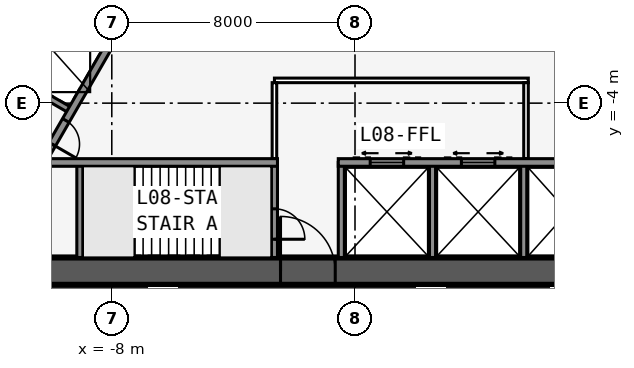
"""IFC4 building model, lengths in metres.
Left out: names, types, materials, properties, quantities, classifications, styles, units other than length and angle.
Written with IfcOpenShell. Run it as: python <this file> out.ifc"""

import sys

from ifc_helpers import new_model, si_unit, direction, frame, frame_2d, origin, place, context, subcontext, project, spatial, rectangle, extrude, element, fill, save


model = new_model("IFC4")
c1 = context("Model", 3, precision=1e-05, world=origin(), true_north=direction((0.0, 1.0)))
c2 = subcontext(c1, "Body", "Model", "MODEL_VIEW")
j1 = project(units=[si_unit("LENGTHUNIT", "METRE"), si_unit("PLANEANGLEUNIT", "RADIAN")], contexts=[c1])
p1 = place(None, origin())
s1 = spatial("IfcSite", under=j1, at=p1, CompositionType="ELEMENT")
p2 = place(p1, origin())
s2 = spatial("IfcBuilding", under=s1, at=p2, CompositionType="ELEMENT")
p3 = place(p2, frame((0.0, 0.0, 38.7)))
s3 = spatial("IfcBuildingStorey", under=s2, at=p3, CompositionType="ELEMENT", Elevation=38.7)
p4 = place(p3, frame((-16.5, -9.526, 0.0), z_axis=(0.0, 0.0, 1.0), x_axis=(1.0, 0.0, 0.0)))
e1 = element("IfcWall", 1, at=p4, inside=s3, PredefinedType="SHEAR", context=c2, shape_type="SweptSolid", body=[
    extrude(rectangle(XDim=33.0, YDim=0.9, at=frame_2d((16.5, 0.0))), origin(), (0.0, 0.0, 1.0), 3.4),
])
p5 = place(p4, frame((14.05, 0.0, 0.0)))
e2 = element("IfcOpeningElement", 2, at=p5, cuts=e1, PredefinedType="OPENING", context=c2, shape_type="SweptSolid", body=[
    extrude(rectangle(XDim=1.8, YDim=2.13, at=frame_2d((0.9, 1.065))), frame((0.0, 0.46, 0.0), z_axis=(0.0, -1.0, 0.0), x_axis=(1.0, 0.0, 0.0)), (0.0, 0.0, 1.0), 0.92),
])
p6 = place(p3, frame((-10.183, -5.951, 0.0), z_axis=(0.0, 0.0, 1.0), x_axis=(1.0, 0.0, 0.0)))
e3 = element("IfcWall", 3, at=p6, inside=s3, PredefinedType="SOLIDWALL", context=c2, shape_type="SweptSolid", body=[
    extrude(rectangle(XDim=7.633, YDim=0.25, at=frame_2d((3.816, 0.0))), origin(), (0.0, 0.0, 1.0), 3.235),
])
p7 = place(p3, frame((-0.55, -5.951, 0.0), z_axis=(0.0, 0.0, 1.0), x_axis=(1.0, 0.0, 0.0)))
e4 = element("IfcWall", 4, at=p7, inside=s3, PredefinedType="SOLIDWALL", context=c2, shape_type="SweptSolid", body=[
    extrude(rectangle(XDim=10.733, YDim=0.25, at=frame_2d((5.366, 0.0))), origin(), (0.0, 0.0, 1.0), 3.235),
])
p8 = place(p7, frame((9.314, 0.0, 0.0)))
e5 = element("IfcOpeningElement", 5, at=p8, cuts=e4, PredefinedType="OPENING", context=c2, shape_type="SweptSolid", body=[
    extrude(rectangle(XDim=0.9, YDim=2.13, at=frame_2d((0.45, 1.065))), frame((0.0, 0.135, 0.0), z_axis=(0.0, -1.0, 0.0), x_axis=(1.0, 0.0, 0.0)), (0.0, 0.0, 1.0), 0.27),
])
p9 = place(p7, frame((1.05, 0.0, 0.0)))
e6 = element("IfcOpeningElement", 6, at=p9, cuts=e4, PredefinedType="OPENING", context=c2, shape_type="SweptSolid", body=[
    extrude(rectangle(XDim=1.1, YDim=2.13, at=frame_2d((0.55, 1.065))), frame((0.0, 0.135, 0.0), z_axis=(0.0, -1.0, 0.0), x_axis=(1.0, 0.0, 0.0)), (0.0, 0.0, 1.0), 0.27),
])
p10 = place(p7, frame((4.05, 0.0, 0.0)))
e7 = element("IfcOpeningElement", 7, at=p10, cuts=e4, PredefinedType="OPENING", context=c2, shape_type="SweptSolid", body=[
    extrude(rectangle(XDim=1.1, YDim=2.13, at=frame_2d((0.55, 1.065))), frame((0.0, 0.135, 0.0), z_axis=(0.0, -1.0, 0.0), x_axis=(1.0, 0.0, 0.0)), (0.0, 0.0, 1.0), 0.27),
])
p11 = place(p3, frame((-9.05, -5.951, 0.0), z_axis=(0.0, 0.0, 1.0), x_axis=(0.0, -1.0, 0.0)))
e8 = element("IfcWall", 8, at=p11, inside=s3, PredefinedType="SOLIDWALL", context=c2, shape_type="SweptSolid", body=[
    extrude(rectangle(XDim=3.125, YDim=0.2, at=frame_2d((1.562, 0.0))), origin(), (0.0, 0.0, 1.0), 3.235),
])
p12 = place(p3, frame((-2.65, -5.951, 0.0), z_axis=(0.0, 0.0, 1.0), x_axis=(0.0, -1.0, 0.0)))
e9 = element("IfcWall", 9, at=p12, inside=s3, PredefinedType="SOLIDWALL", context=c2, shape_type="SweptSolid", body=[
    extrude(rectangle(XDim=3.125, YDim=0.2, at=frame_2d((1.562, 0.0))), origin(), (0.0, 0.0, 1.0), 3.235),
])
p13 = place(p12, frame((1.525, 0.0, 0.0)))
e10 = element("IfcOpeningElement", 10, at=p13, cuts=e9, PredefinedType="OPENING", context=c2, shape_type="SweptSolid", body=[
    extrude(rectangle(XDim=1.0, YDim=2.13, at=frame_2d((0.5, 1.065))), frame((0.0, 0.11, 0.0), z_axis=(0.0, -1.0, 0.0), x_axis=(1.0, 0.0, 0.0)), (0.0, 0.0, 1.0), 0.22),
])
for number, where, z_axis, x_axis in (
    (11, (-0.45, -5.951, 0.0), (0.0, 0.0, 1.0), (0.0, -1.0, 0.0)),
    (12, (2.55, -5.951, 0.0), (0.0, 0.0, 1.0), (0.0, -1.0, 0.0)),
    (13, (5.55, -5.951, 0.0), (0.0, 0.0, 1.0), (0.0, -1.0, 0.0)),
):
    element("IfcWall", number, at=place(p3, frame(where, z_axis=z_axis, x_axis=x_axis)), inside=s3, PredefinedType="SOLIDWALL", context=c2, shape_type="SweptSolid", body=[
        extrude(rectangle(XDim=3.125, YDim=0.2, at=frame_2d((1.562, 0.0))), origin(), (0.0, 0.0, 1.0), 3.235),
    ])
p14 = place(p3, frame((16.5, -9.526, 0.0), z_axis=(0.0, 0.0, 1.0), x_axis=(-0.499999749417, 0.866025548458, 0.0)))
e14 = element("IfcWall", 14, at=p14, inside=s3, PredefinedType="SHEAR", context=c2, shape_type="SweptSolid", body=[
    extrude(rectangle(XDim=33.0, YDim=0.9, at=frame_2d((16.5, 0.0))), origin(), (0.0, 0.0, 1.0), 3.4),
])
p15 = place(p14, frame((14.15, 0.0, 0.0)))
e15 = element("IfcOpeningElement", 15, at=p15, cuts=e14, PredefinedType="OPENING", context=c2, shape_type="SweptSolid", body=[
    extrude(rectangle(XDim=1.8, YDim=2.13, at=frame_2d((0.9, 1.065))), frame((0.0, 0.46, 0.0), z_axis=(0.0, -1.0, 0.0), x_axis=(1.0, 0.0, 0.0)), (0.0, 0.0, 1.0), 0.92),
])
p16 = place(p14, frame((12.6, 0.0, 0.0)))
e16 = element("IfcOpeningElement", 16, at=p16, cuts=e14, PredefinedType="OPENING", context=c2, shape_type="SweptSolid", body=[
    extrude(rectangle(XDim=1.0, YDim=2.13, at=frame_2d((0.5, 1.065))), frame((0.0, 0.46, 0.0), z_axis=(0.0, -1.0, 0.0), x_axis=(1.0, 0.0, 0.0)), (0.0, 0.0, 1.0), 0.92),
])
p17 = place(p3, frame((10.245, -5.843, 0.0), z_axis=(0.0, 0.0, 1.0), x_axis=(-0.499993009313, 0.866029439822, 0.0)))
e17 = element("IfcWall", 17, at=p17, inside=s3, PredefinedType="SOLIDWALL", context=c2, shape_type="SweptSolid", body=[
    extrude(rectangle(XDim=7.733, YDim=0.25, at=frame_2d((3.866, 0.0))), origin(), (0.0, 0.0, 1.0), 3.235),
])
p18 = place(p3, frame((0.0, 19.052, 0.0), z_axis=(0.0, 0.0, 1.0), x_axis=(-0.499999749417, -0.866025548458, 0.0)))
e18 = element("IfcWall", 18, at=p18, inside=s3, PredefinedType="SHEAR", context=c2, shape_type="SweptSolid", body=[
    extrude(rectangle(XDim=33.0, YDim=0.9, at=frame_2d((16.5, 0.0))), origin(), (0.0, 0.0, 1.0), 3.4),
])
p19 = place(p18, frame((14.15, 0.0, 0.0)))
e19 = element("IfcOpeningElement", 19, at=p19, cuts=e18, PredefinedType="OPENING", context=c2, shape_type="SweptSolid", body=[
    extrude(rectangle(XDim=1.8, YDim=2.13, at=frame_2d((0.9, 1.065))), frame((0.0, 0.46, 0.0), z_axis=(0.0, -1.0, 0.0), x_axis=(1.0, 0.0, 0.0)), (0.0, 0.0, 1.0), 0.92),
])
p20 = place(p18, frame((12.6, 0.0, 0.0)))
e20 = element("IfcOpeningElement", 20, at=p20, cuts=e18, PredefinedType="OPENING", context=c2, shape_type="SweptSolid", body=[
    extrude(rectangle(XDim=1.0, YDim=2.13, at=frame_2d((0.5, 1.065))), frame((0.0, 0.46, 0.0), z_axis=(0.0, -1.0, 0.0), x_axis=(1.0, 0.0, 0.0)), (0.0, 0.0, 1.0), 0.92),
])
p21 = place(p3, frame((-4.929, 3.365, 0.0), z_axis=(0.0, 0.0, 1.0), x_axis=(-0.499991433582, -0.866030349552, 0.0)))
e21 = element("IfcWall", 21, at=p21, inside=s3, PredefinedType="SOLIDWALL", context=c2, shape_type="SweptSolid", body=[
    extrude(rectangle(XDim=10.633, YDim=0.25, at=frame_2d((5.316, 0.0))), origin(), (0.0, 0.0, 1.0), 3.235),
])
p22 = place(p21, frame((9.164, 0.0, 0.0)))
e22 = element("IfcOpeningElement", 22, at=p22, cuts=e21, PredefinedType="OPENING", context=c2, shape_type="SweptSolid", body=[
    extrude(rectangle(XDim=0.9, YDim=2.13, at=frame_2d((0.45, 1.065))), frame((0.0, 0.135, 0.0), z_axis=(0.0, -1.0, 0.0), x_axis=(1.0, 0.0, 0.0)), (0.0, 0.0, 1.0), 0.27),
])
p23 = place(p3, frame((-9.329, -4.256, 0.0), z_axis=(0.0, 0.0, 1.0), x_axis=(-0.866022959057, 0.500004234368, 0.0)))
e23 = element("IfcWall", 23, at=p23, inside=s3, PredefinedType="SOLIDWALL", context=c2, shape_type="SweptSolid", body=[
    extrude(rectangle(XDim=3.125, YDim=0.2, at=frame_2d((1.562, 0.0))), origin(), (0.0, 0.0, 1.0), 3.235),
])
p24 = place(p3, frame((21.586, -11.885, 0.0), z_axis=(0.0, 0.0, 1.0), x_axis=(-0.500001915564, 0.86602429783, 0.0)))
e24 = element("IfcWall", 24, at=p24, inside=s3, PredefinedType="PARTITIONING", context=c2, shape_type="SweptSolid", body=[
    extrude(rectangle(XDim=42.172, YDim=0.15, at=frame_2d((21.086, 0.0))), origin(), (0.0, 0.0, 1.0), 3.235),
])
p25 = place(p24, frame((1.911, 0.0, 0.0)))
e25 = element("IfcOpeningElement", 25, at=p25, cuts=e24, PredefinedType="OPENING", context=c2, shape_type="SweptSolid", body=[
    extrude(rectangle(XDim=0.95, YDim=2.13, at=frame_2d((0.475, 1.065))), frame((0.0, 0.085, 0.0), z_axis=(0.0, -1.0, 0.0), x_axis=(1.0, 0.0, 0.0)), (0.0, 0.0, 1.0), 0.17),
])
p26 = place(p24, frame((7.511, 0.0, 0.0)))
e26 = element("IfcOpeningElement", 26, at=p26, cuts=e24, PredefinedType="OPENING", context=c2, shape_type="SweptSolid", body=[
    extrude(rectangle(XDim=0.95, YDim=2.13, at=frame_2d((0.475, 1.065))), frame((0.0, 0.085, 0.0), z_axis=(0.0, -1.0, 0.0), x_axis=(1.0, 0.0, 0.0)), (0.0, 0.0, 1.0), 0.17),
])
p27 = place(p24, frame((13.711, 0.0, 0.0)))
e27 = element("IfcOpeningElement", 27, at=p27, cuts=e24, PredefinedType="OPENING", context=c2, shape_type="SweptSolid", body=[
    extrude(rectangle(XDim=0.95, YDim=2.13, at=frame_2d((0.475, 1.065))), frame((0.0, 0.085, 0.0), z_axis=(0.0, -1.0, 0.0), x_axis=(1.0, 0.0, 0.0)), (0.0, 0.0, 1.0), 0.17),
])
p28 = place(p24, frame((21.911, 0.0, 0.0)))
e28 = element("IfcOpeningElement", 28, at=p28, cuts=e24, PredefinedType="OPENING", context=c2, shape_type="SweptSolid", body=[
    extrude(rectangle(XDim=0.95, YDim=2.13, at=frame_2d((0.475, 1.065))), frame((0.0, 0.085, 0.0), z_axis=(0.0, -1.0, 0.0), x_axis=(1.0, 0.0, 0.0)), (0.0, 0.0, 1.0), 0.17),
])
p29 = place(p24, frame((28.711, 0.0, 0.0)))
e29 = element("IfcOpeningElement", 29, at=p29, cuts=e24, PredefinedType="OPENING", context=c2, shape_type="SweptSolid", body=[
    extrude(rectangle(XDim=0.95, YDim=2.13, at=frame_2d((0.475, 1.065))), frame((0.0, 0.085, 0.0), z_axis=(0.0, -1.0, 0.0), x_axis=(1.0, 0.0, 0.0)), (0.0, 0.0, 1.0), 0.17),
])
p30 = place(p24, frame((31.911, 0.0, 0.0)))
e30 = element("IfcOpeningElement", 30, at=p30, cuts=e24, PredefinedType="OPENING", context=c2, shape_type="SweptSolid", body=[
    extrude(rectangle(XDim=0.95, YDim=2.13, at=frame_2d((0.475, 1.065))), frame((0.0, 0.085, 0.0), z_axis=(0.0, -1.0, 0.0), x_axis=(1.0, 0.0, 0.0)), (0.0, 0.0, 1.0), 0.17),
])
p31 = place(p24, frame((39.311, 0.0, 0.0)))
e31 = element("IfcOpeningElement", 31, at=p31, cuts=e24, PredefinedType="OPENING", context=c2, shape_type="SweptSolid", body=[
    extrude(rectangle(XDim=0.95, YDim=2.13, at=frame_2d((0.475, 1.065))), frame((0.0, 0.085, 0.0), z_axis=(0.0, -1.0, 0.0), x_axis=(1.0, 0.0, 0.0)), (0.0, 0.0, 1.0), 0.17),
])
p32 = place(p3, frame((-0.5, 22.836, 0.0), z_axis=(0.0, 0.0, 1.0), x_axis=(-0.500001677587, -0.866024435227, 0.0)))
e32 = element("IfcWall", 32, at=p32, inside=s3, PredefinedType="PARTITIONING", context=c2, shape_type="SweptSolid", body=[
    extrude(rectangle(XDim=39.054, YDim=0.15, at=frame_2d((19.527, 0.0))), origin(), (0.0, 0.0, 1.0), 3.235),
])
p33 = place(p32, frame((0.352, 0.0, 0.0)))
e33 = element("IfcOpeningElement", 33, at=p33, cuts=e32, PredefinedType="OPENING", context=c2, shape_type="SweptSolid", body=[
    extrude(rectangle(XDim=0.95, YDim=2.13, at=frame_2d((0.475, 1.065))), frame((0.0, 0.085, 0.0), z_axis=(0.0, -1.0, 0.0), x_axis=(1.0, 0.0, 0.0)), (0.0, 0.0, 1.0), 0.17),
])
p34 = place(p32, frame((5.952, 0.0, 0.0)))
e34 = element("IfcOpeningElement", 34, at=p34, cuts=e32, PredefinedType="OPENING", context=c2, shape_type="SweptSolid", body=[
    extrude(rectangle(XDim=0.95, YDim=2.13, at=frame_2d((0.475, 1.065))), frame((0.0, 0.085, 0.0), z_axis=(0.0, -1.0, 0.0), x_axis=(1.0, 0.0, 0.0)), (0.0, 0.0, 1.0), 0.17),
])
p35 = place(p32, frame((11.552, 0.0, 0.0)))
e35 = element("IfcOpeningElement", 35, at=p35, cuts=e32, PredefinedType="OPENING", context=c2, shape_type="SweptSolid", body=[
    extrude(rectangle(XDim=0.95, YDim=2.13, at=frame_2d((0.475, 1.065))), frame((0.0, 0.085, 0.0), z_axis=(0.0, -1.0, 0.0), x_axis=(1.0, 0.0, 0.0)), (0.0, 0.0, 1.0), 0.17),
])
p36 = place(p32, frame((21.552, 0.0, 0.0)))
e36 = element("IfcOpeningElement", 36, at=p36, cuts=e32, PredefinedType="OPENING", context=c2, shape_type="SweptSolid", body=[
    extrude(rectangle(XDim=0.95, YDim=2.13, at=frame_2d((0.475, 1.065))), frame((0.0, 0.085, 0.0), z_axis=(0.0, -1.0, 0.0), x_axis=(1.0, 0.0, 0.0)), (0.0, 0.0, 1.0), 0.17),
])
p37 = place(p32, frame((30.952, 0.0, 0.0)))
e37 = element("IfcOpeningElement", 37, at=p37, cuts=e32, PredefinedType="OPENING", context=c2, shape_type="SweptSolid", body=[
    extrude(rectangle(XDim=0.95, YDim=2.13, at=frame_2d((0.475, 1.065))), frame((0.0, 0.085, 0.0), z_axis=(0.0, -1.0, 0.0), x_axis=(1.0, 0.0, 0.0)), (0.0, 0.0, 1.0), 0.17),
])
p38 = place(p32, frame((37.752, 0.0, 0.0)))
e38 = element("IfcOpeningElement", 38, at=p38, cuts=e32, PredefinedType="OPENING", context=c2, shape_type="SweptSolid", body=[
    extrude(rectangle(XDim=0.95, YDim=2.13, at=frame_2d((0.475, 1.065))), frame((0.0, 0.085, 0.0), z_axis=(0.0, -1.0, 0.0), x_axis=(1.0, 0.0, 0.0)), (0.0, 0.0, 1.0), 0.17),
])
p39 = place(p3, frame((-2.65, -3.251, 0.0), z_axis=(0.0, 0.0, 1.0), x_axis=(1.0, 0.0, 0.0)))
e39 = element("IfcWall", 39, at=p39, inside=s3, PredefinedType="PARTITIONING", context=c2, shape_type="SweptSolid", body=[
    extrude(rectangle(XDim=8.35, YDim=0.15, at=frame_2d((4.175, 0.0))), origin(), (0.0, 0.0, 1.0), 3.235),
])
for number, where, z_axis, x_axis in (
    (40, (-2.65, -5.826, 0.0), (0.0, 0.0, 1.0), (0.0, 1.0, 0.0)),
    (41, (5.625, -5.826, 0.0), (0.0, 0.0, 1.0), (0.0, 1.0, 0.0)),
):
    element("IfcWall", number, at=place(p3, frame(where, z_axis=z_axis, x_axis=x_axis)), inside=s3, PredefinedType="PARTITIONING", context=c2, shape_type="SweptSolid", body=[
        extrude(rectangle(XDim=2.5, YDim=0.15, at=frame_2d((1.25, 0.0))), origin(), (0.0, 0.0, 1.0), 3.235),
    ])
p40 = place(p3, frame((-7.247, -7.576, 0.0), z_axis=(0.0, 0.0, 1.0), x_axis=(1.0, 0.0, 0.0)))
e42 = element("IfcWall", 42, at=p40, inside=s3, PredefinedType="SOLIDWALL", context=c2, shape_type="SweptSolid", body=[
    extrude(rectangle(XDim=2.794, YDim=0.1, at=frame_2d((1.397, 0.0))), origin(), (0.0, 0.0, 1.0), 3.4),
])
p41 = place(p5, origin())
e43 = element("IfcDoor", 43, at=p41, inside=s3, OperationType="DOUBLE_DOOR_SINGLE_SWING", PredefinedType="DOOR", context=c2, shape_type="SweptSolid", body=[
    extrude(rectangle(XDim=1.8, YDim=2.13, at=frame_2d((0.9, 1.065))), frame((0.0, 0.025, 0.0), z_axis=(0.0, -1.0, 0.0), x_axis=(1.0, 0.0, 0.0)), (0.0, 0.0, 1.0), 0.05),
])
fill(e2, e43)
p42 = place(p13, origin())
e44 = element("IfcDoor", 44, at=p42, inside=s3, OperationType="SINGLE_SWING_RIGHT", PredefinedType="DOOR", context=c2, shape_type="SweptSolid", body=[
    extrude(rectangle(XDim=1.0, YDim=2.13, at=frame_2d((0.5, 1.065))), frame((0.0, 0.025, 0.0), z_axis=(0.0, -1.0, 0.0), x_axis=(1.0, 0.0, 0.0)), (0.0, 0.0, 1.0), 0.05),
])
fill(e10, e44)
p43 = place(p22, origin())
e45 = element("IfcDoor", 45, at=p43, inside=s3, OperationType="SINGLE_SWING_RIGHT", PredefinedType="DOOR", context=c2, shape_type="SweptSolid", body=[
    extrude(rectangle(XDim=0.9, YDim=2.13, at=frame_2d((0.45, 1.065))), frame((0.0, 0.025, 0.0), z_axis=(0.0, -1.0, 0.0), x_axis=(1.0, 0.0, 0.0)), (0.0, 0.0, 1.0), 0.05),
])
fill(e22, e45)
p44 = place(p9, origin())
e46 = element("IfcDoor", 46, at=p44, inside=s3, OperationType="DOUBLE_DOOR_SLIDING", PredefinedType="USERDEFINED", context=c2, shape_type="SweptSolid", body=[
    extrude(rectangle(XDim=1.1, YDim=2.13, at=frame_2d((0.55, 1.065))), frame((0.0, 0.025, 0.0), z_axis=(0.0, -1.0, 0.0), x_axis=(1.0, 0.0, 0.0)), (0.0, 0.0, 1.0), 0.05),
])
fill(e6, e46)
p45 = place(p10, origin())
e47 = element("IfcDoor", 47, at=p45, inside=s3, OperationType="DOUBLE_DOOR_SLIDING", PredefinedType="USERDEFINED", context=c2, shape_type="SweptSolid", body=[
    extrude(rectangle(XDim=1.1, YDim=2.13, at=frame_2d((0.55, 1.065))), frame((0.0, 0.025, 0.0), z_axis=(0.0, -1.0, 0.0), x_axis=(1.0, 0.0, 0.0)), (0.0, 0.0, 1.0), 0.05),
])
fill(e7, e47)
save(model, sys.argv[1])
